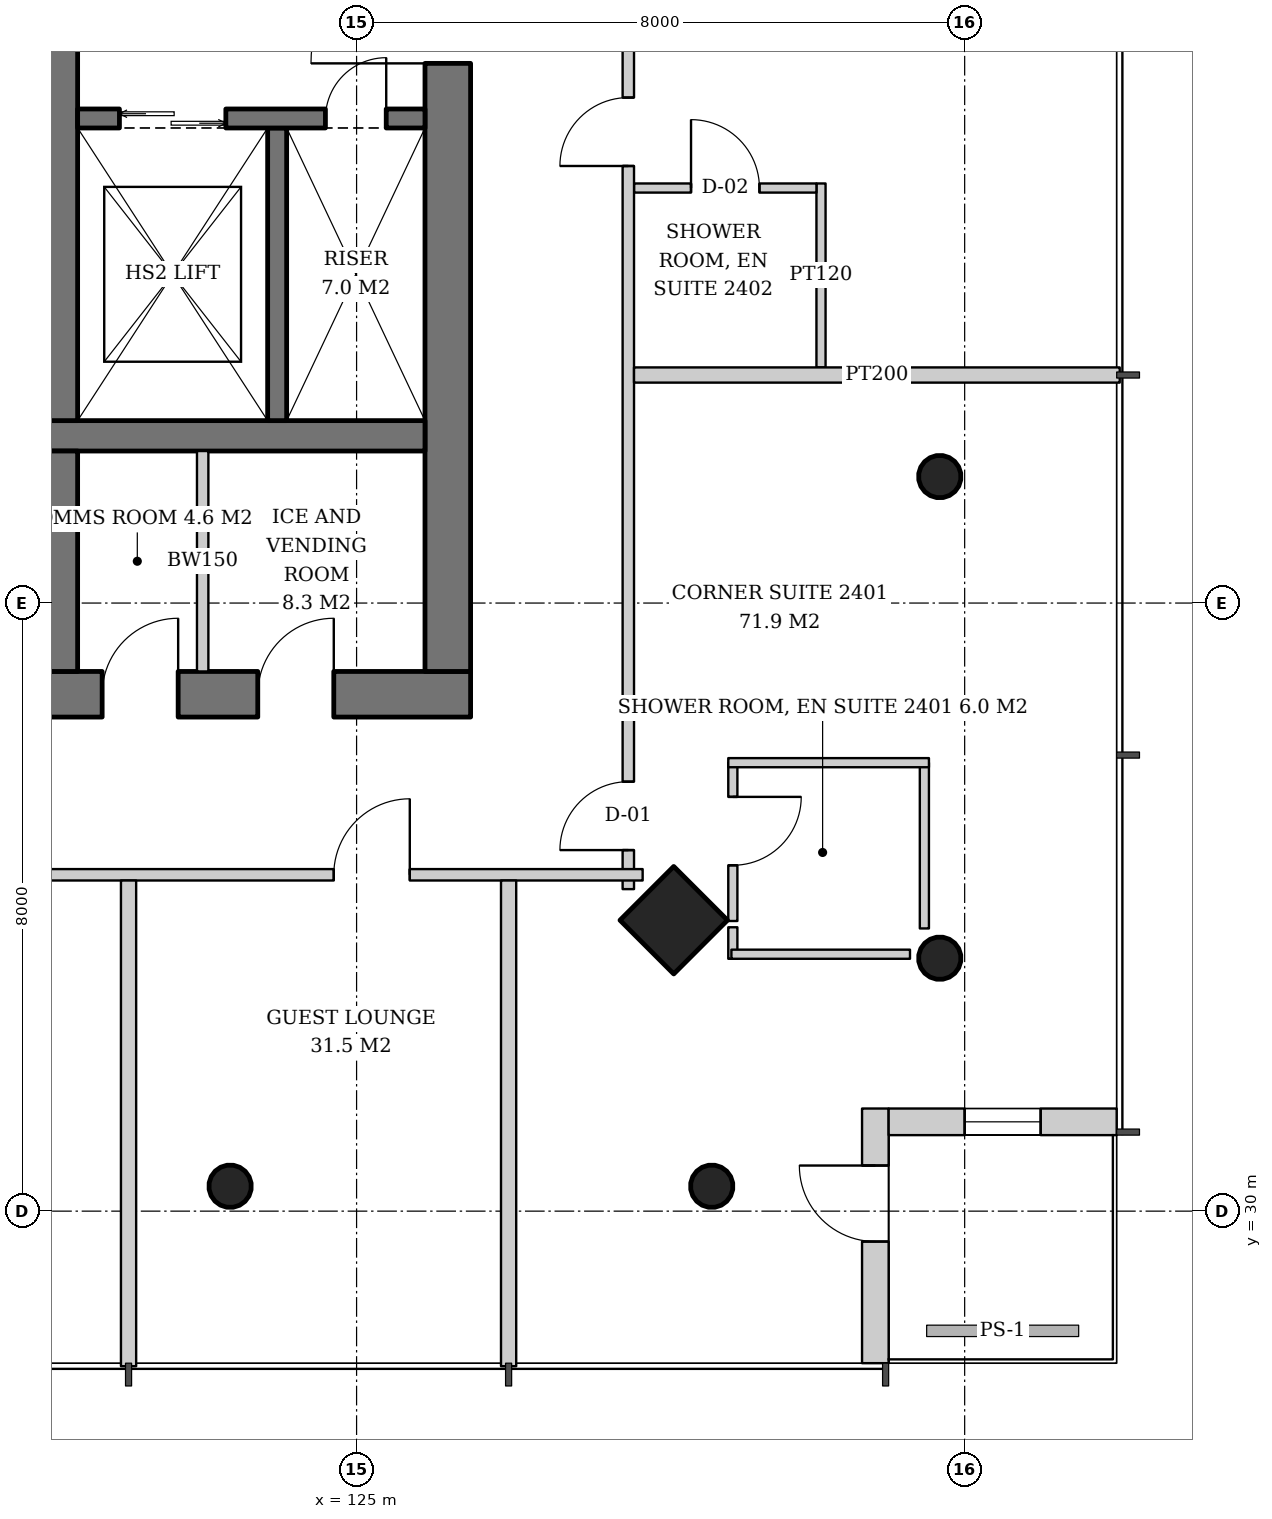
"""IFC4 building model, lengths in metres.
Left out: names, types, materials, properties, quantities, classifications, styles, units other than length and angle.
Written with IfcOpenShell. Run it as: python <this file> out.ifc"""

import sys

from ifc_helpers import new_model, si_unit, direction, frame, frame_2d, origin, origin_2d, place, context, subcontext, project, spatial, rectangle, hollow_circle, extrude, element, fill, save


model = new_model("IFC4")
c1 = context("Model", 3, precision=1e-05, world=origin(), true_north=direction((0.0, 1.0)))
c2 = subcontext(c1, "Body", "Model", "MODEL_VIEW")
j1 = project(units=[si_unit("LENGTHUNIT", "METRE"), si_unit("PLANEANGLEUNIT", "RADIAN")], contexts=[c1])
p1 = place(None, origin())
s1 = spatial("IfcSite", under=j1, at=p1, CompositionType="ELEMENT")
p2 = place(p1, origin())
s2 = spatial("IfcBuilding", under=s1, at=p2, CompositionType="ELEMENT")
p3 = place(p2, frame((0.0, 0.0, 97.0)))
s3 = spatial("IfcBuildingStorey", under=s2, at=p3, CompositionType="ELEMENT", Elevation=97.0)
p4 = place(p3, frame((132.724, 33.276, 0.0), z_axis=(-0.043029647111, 0.043029647111, 0.998146732169), x_axis=(-0.707106781187, -0.707106781187, 0.0)))
e1 = element("IfcColumn", 1, at=p4, inside=s3, PredefinedType="COLUMN", context=c2, shape_type="SweptSolid", body=[
    extrude(hollow_circle(Radius=0.28, WallThickness=0.02, at=origin_2d()), origin(), (0.0, 0.0, 1.0), 3.807),
])
p5 = place(p3, frame((132.724, 39.638, 0.0), z_axis=(-0.043059584825, 0.021497706284, 0.998841188968), x_axis=(-0.446680166538, -0.894693706707, 0.0)))
e2 = element("IfcColumn", 2, at=p5, inside=s3, PredefinedType="COLUMN", context=c2, shape_type="SweptSolid", body=[
    extrude(hollow_circle(Radius=0.28, WallThickness=0.02, at=origin_2d()), origin(), (0.0, 0.0, 1.0), 3.804),
])
p6 = place(p3, frame((129.224, 33.776, 0.0), z_axis=(-0.043029647111, 0.043029647111, 0.998146732169), x_axis=(-0.707106781187, -0.707106781187, 0.0)))
e3 = element("IfcColumn", 3, at=p6, inside=s3, PredefinedType="COLUMN", context=c2, shape_type="SweptSolid", body=[
    extrude(rectangle(XDim=1.0, YDim=1.0, at=origin_2d()), origin(), (0.0, 0.0, 1.0), 3.807),
])
p7 = place(p3, frame((129.724, 30.276, 0.0), z_axis=(-0.043029647111, 0.043029647111, 0.998146732169), x_axis=(-0.707106781187, -0.707106781187, 0.0)))
e4 = element("IfcColumn", 4, at=p7, inside=s3, PredefinedType="COLUMN", context=c2, shape_type="SweptSolid", body=[
    extrude(hollow_circle(Radius=0.28, WallThickness=0.02, at=origin_2d()), origin(), (0.0, 0.0, 1.0), 3.807),
])
p8 = place(p3, frame((123.362, 30.276, 0.0), z_axis=(-0.021497706284, 0.043059584825, 0.998841188968), x_axis=(-0.894693706707, -0.446680166538, 0.0)))
e5 = element("IfcColumn", 5, at=p8, inside=s3, PredefinedType="COLUMN", context=c2, shape_type="SweptSolid", body=[
    extrude(hollow_circle(Radius=0.28, WallThickness=0.02, at=origin_2d()), origin(), (0.0, 0.0, 1.0), 3.804),
])
p9 = place(p3, frame((107.5, 36.8, 0.0), z_axis=(0.0, 0.0, 1.0), x_axis=(1.0, 0.0, 0.0)))
e6 = element("IfcWall", 6, at=p9, inside=s3, PredefinedType="SHEAR", context=c2, shape_type="SweptSolid", body=[
    extrude(rectangle(XDim=19.0, YDim=0.6, at=frame_2d((9.5, 0.0))), origin(), (0.0, 0.0, 1.0), 3.8),
])
p10 = place(p9, frame((3.9, 0.0, 0.0)))
e7 = element("IfcOpeningElement", 7, at=p10, cuts=e6, PredefinedType="OPENING", context=c2, shape_type="SweptSolid", body=[
    extrude(rectangle(XDim=1.0, YDim=2.1, at=frame_2d((0.5, 1.05))), frame((0.0, 0.31, 0.0), z_axis=(0.0, -1.0, 0.0), x_axis=(1.0, 0.0, 0.0)), (0.0, 0.0, 1.0), 0.62),
])
p11 = place(p9, frame((14.153, 0.0, 0.0)))
e8 = element("IfcOpeningElement", 8, at=p11, cuts=e6, PredefinedType="OPENING", context=c2, shape_type="SweptSolid", body=[
    extrude(rectangle(XDim=1.0, YDim=2.1, at=frame_2d((0.5, 1.05))), frame((0.0, 0.31, 0.0), z_axis=(0.0, -1.0, 0.0), x_axis=(1.0, 0.0, 0.0)), (0.0, 0.0, 1.0), 0.62),
])
p12 = place(p9, frame((16.2, 0.0, 0.0)))
e9 = element("IfcOpeningElement", 9, at=p12, cuts=e6, PredefinedType="OPENING", context=c2, shape_type="SweptSolid", body=[
    extrude(rectangle(XDim=1.0, YDim=2.1, at=frame_2d((0.5, 1.05))), frame((0.0, 0.31, 0.0), z_axis=(0.0, -1.0, 0.0), x_axis=(1.0, 0.0, 0.0)), (0.0, 0.0, 1.0), 0.62),
])
p13 = place(p3, frame((126.2, 37.1, 0.0), z_axis=(0.0, 0.0, 1.0), x_axis=(0.0, 1.0, 0.0)))
e10 = element("IfcWall", 10, at=p13, inside=s3, PredefinedType="SHEAR", context=c2, shape_type="SweptSolid", body=[
    extrude(rectangle(XDim=17.8, YDim=0.6, at=frame_2d((8.9, 0.0))), origin(), (0.0, 0.0, 1.0), 3.8),
])
p14 = place(p13, frame((8.0, 0.0, 0.0)))
e11 = element("IfcOpeningElement", 11, at=p14, cuts=e10, PredefinedType="OPENING", context=c2, shape_type="SweptSolid", body=[
    extrude(rectangle(XDim=1.8, YDim=2.4, at=frame_2d((0.9, 1.2))), frame((0.0, 0.31, 0.0), z_axis=(0.0, -1.0, 0.0), x_axis=(1.0, 0.0, 0.0)), (0.0, 0.0, 1.0), 0.62),
])
p15 = place(p3, frame((108.1, 40.2, 0.0), z_axis=(0.0, 0.0, 1.0), x_axis=(1.0, 0.0, 0.0)))
e12 = element("IfcWall", 12, at=p15, inside=s3, PredefinedType="SHEAR", context=c2, shape_type="SweptSolid", body=[
    extrude(rectangle(XDim=17.8, YDim=0.4, at=frame_2d((8.9, 0.0))), origin(), (0.0, 0.0, 1.0), 3.8),
])
p16 = place(p3, frame((121.13, 37.1, 0.0), z_axis=(0.0, 0.0, 1.0), x_axis=(0.0, 1.0, 0.0)))
e13 = element("IfcWall", 13, at=p16, inside=s3, PredefinedType="SHEAR", context=c2, shape_type="SweptSolid", body=[
    extrude(rectangle(XDim=2.9, YDim=0.4, at=frame_2d((1.45, 0.0))), origin(), (0.0, 0.0, 1.0), 3.8),
])
p17 = place(p3, frame((121.13, 40.4, 0.0), z_axis=(0.0, 0.0, 1.0), x_axis=(0.0, 1.0, 0.0)))
e14 = element("IfcWall", 14, at=p17, inside=s3, PredefinedType="SHEAR", context=c2, shape_type="SweptSolid", body=[
    extrude(rectangle(XDim=11.2, YDim=0.4, at=frame_2d((5.6, 0.0))), origin(), (0.0, 0.0, 1.0), 3.8),
])
p18 = place(p3, frame((131.825, 28.0, 0.0), z_axis=(0.0, 0.0, 1.0), x_axis=(0.0, 1.0, 0.0)))
e15 = element("IfcWall", 15, at=p18, inside=s3, PredefinedType="SOLIDWALL", context=c2, shape_type="SweptSolid", body=[
    extrude(rectangle(XDim=3.35, YDim=0.35, at=frame_2d((1.675, 0.0))), origin(), (0.0, 0.0, 1.0), 3.6),
])
p19 = place(p18, frame((1.6, 0.0, 0.0)))
e16 = element("IfcOpeningElement", 16, at=p19, cuts=e15, PredefinedType="OPENING", context=c2, shape_type="SweptSolid", body=[
    extrude(rectangle(XDim=1.0, YDim=2.4, at=frame_2d((0.5, 1.2))), frame((0.0, 0.185, 0.0), z_axis=(0.0, -1.0, 0.0), x_axis=(1.0, 0.0, 0.0)), (0.0, 0.0, 1.0), 0.37),
])
p20 = place(p3, frame((132.0, 31.175, 0.0), z_axis=(0.0, 0.0, 1.0), x_axis=(1.0, 0.0, 0.0)))
e17 = element("IfcWall", 17, at=p20, inside=s3, PredefinedType="SOLIDWALL", context=c2, shape_type="SweptSolid", body=[
    extrude(rectangle(XDim=3.0, YDim=0.35, at=frame_2d((1.5, 0.0))), origin(), (0.0, 0.0, 1.0), 3.6),
])
p21 = place(p20, frame((1.0, 0.0, 0.9)))
e18 = element("IfcOpeningElement", 18, at=p21, cuts=e17, PredefinedType="OPENING", context=c2, shape_type="SweptSolid", body=[
    extrude(rectangle(XDim=1.0, YDim=2.4, at=frame_2d((0.5, 1.2))), frame((0.0, 0.185, 0.0), z_axis=(0.0, -1.0, 0.0), x_axis=(1.0, 0.0, 0.0)), (0.0, 0.0, 1.0), 0.37),
])
p22 = place(p3, frame((123.955, 44.25, 0.0), z_axis=(0.0, 0.0, 1.0), x_axis=(0.0, -1.0, 0.0)))
e19 = element("IfcWall", 19, at=p22, inside=s3, PredefinedType="SHEAR", context=c2, shape_type="SweptSolid", body=[
    extrude(rectangle(XDim=3.85, YDim=0.25, at=frame_2d((1.925, 0.0))), origin(), (0.0, 0.0, 1.0), 3.8),
])
p23 = place(p3, frame((121.33, 44.375, 0.0), z_axis=(0.0, 0.0, 1.0), x_axis=(1.0, 0.0, 0.0)))
e20 = element("IfcWall", 20, at=p23, inside=s3, PredefinedType="SHEAR", context=c2, shape_type="SweptSolid", body=[
    extrude(rectangle(XDim=4.57, YDim=0.25, at=frame_2d((2.285, 0.0))), origin(), (0.0, 0.0, 1.0), 3.8),
])
p24 = place(p23, frame((0.55, 0.0, 0.0)))
e21 = element("IfcOpeningElement", 21, at=p24, cuts=e20, PredefinedType="OPENING", context=c2, shape_type="SweptSolid", body=[
    extrude(rectangle(XDim=1.4, YDim=2.4, at=frame_2d((0.7, 1.2))), frame((0.0, 0.135, 0.0), z_axis=(0.0, -1.0, 0.0), x_axis=(1.0, 0.0, 0.0)), (0.0, 0.0, 1.0), 0.27),
])
p25 = place(p23, frame((3.26, 0.0, 0.0)))
e22 = element("IfcOpeningElement", 22, at=p25, cuts=e20, PredefinedType="OPENING", context=c2, shape_type="SweptSolid", body=[
    extrude(rectangle(XDim=0.8, YDim=2.0, at=frame_2d((0.4, 1.0))), frame((0.0, 0.135, 0.0), z_axis=(0.0, -1.0, 0.0), x_axis=(1.0, 0.0, 0.0)), (0.0, 0.0, 1.0), 0.27),
])
p26 = place(p3, frame((122.975, 37.1, 0.0), z_axis=(0.0, 0.0, 1.0), x_axis=(0.0, 1.0, 0.0)))
e23 = element("IfcWall", 23, at=p26, inside=s3, PredefinedType="SOLIDWALL", context=c2, shape_type="SweptSolid", body=[
    extrude(rectangle(XDim=2.9, YDim=0.15, at=frame_2d((1.45, 0.0))), origin(), (0.0, 0.0, 1.0), 3.6),
])
p27 = place(p3, frame((129.95, 35.9, 0.0), z_axis=(0.0, 0.0, 1.0), x_axis=(0.0, -1.0, 0.0)))
e24 = element("IfcWall", 24, at=p27, inside=s3, PredefinedType="PARTITIONING", context=c2, shape_type="SweptSolid", body=[
    extrude(rectangle(XDim=2.083, YDim=0.12, at=frame_2d((1.042, 0.0))), origin(), (0.0, 0.0, 1.0), 3.2),
])
p28 = place(p27, frame((0.45, 0.0, 0.0)))
e25 = element("IfcOpeningElement", 25, at=p28, cuts=e24, PredefinedType="OPENING", context=c2, shape_type="SweptSolid", body=[
    extrude(rectangle(XDim=0.9, YDim=2.1, at=frame_2d((0.45, 1.05))), frame((0.0, 0.07, 0.0), z_axis=(0.0, -1.0, 0.0), x_axis=(1.0, 0.0, 0.0)), (0.0, 0.0, 1.0), 0.14),
])
p29 = place(p3, frame((129.95, 33.735, 0.0), z_axis=(0.0, 0.0, 1.0), x_axis=(0.0, -1.0, 0.0)))
e26 = element("IfcWall", 26, at=p29, inside=s3, PredefinedType="PARTITIONING", context=c2, shape_type="SweptSolid", body=[
    extrude(rectangle(XDim=0.415, YDim=0.12, at=frame_2d((0.207, 0.0))), origin(), (0.0, 0.0, 1.0), 3.2),
])
p30 = place(p3, frame((132.47, 35.9, 0.0), z_axis=(0.0, 0.0, 1.0), x_axis=(0.0, -1.0, 0.0)))
e27 = element("IfcWall", 27, at=p30, inside=s3, PredefinedType="PARTITIONING", context=c2, shape_type="SweptSolid", body=[
    extrude(rectangle(XDim=2.181, YDim=0.12, at=frame_2d((1.09, 0.0))), origin(), (0.0, 0.0, 1.0), 3.2),
])
p31 = place(p3, frame((129.931, 33.38, 0.0), z_axis=(0.0, 0.0, 1.0), x_axis=(1.0, 0.0, 0.0)))
e28 = element("IfcWall", 28, at=p31, inside=s3, PredefinedType="PARTITIONING", context=c2, shape_type="SweptSolid", body=[
    extrude(rectangle(XDim=2.35, YDim=0.12, at=frame_2d((1.175, 0.0))), origin(), (0.0, 0.0, 1.0), 3.2),
])
p32 = place(p3, frame((129.89, 35.9, 0.0), z_axis=(0.0, 0.0, 1.0), x_axis=(1.0, 0.0, 0.0)))
e29 = element("IfcWall", 29, at=p32, inside=s3, PredefinedType="PARTITIONING", context=c2, shape_type="SweptSolid", body=[
    extrude(rectangle(XDim=2.64, YDim=0.12, at=frame_2d((1.32, 0.0))), origin(), (0.0, 0.0, 1.0), 3.2),
])
p33 = place(p3, frame((131.11, 41.1, 0.0), z_axis=(0.0, 0.0, 1.0), x_axis=(0.0, 1.0, 0.0)))
e30 = element("IfcWall", 30, at=p33, inside=s3, PredefinedType="PARTITIONING", context=c2, shape_type="SweptSolid", body=[
    extrude(rectangle(XDim=2.42, YDim=0.12, at=frame_2d((1.21, 0.0))), origin(), (0.0, 0.0, 1.0), 3.6),
])
p34 = place(p3, frame((128.65, 43.46, 0.0), z_axis=(0.0, 0.0, 1.0), x_axis=(1.0, 0.0, 0.0)))
e31 = element("IfcWall", 31, at=p34, inside=s3, PredefinedType="PARTITIONING", context=c2, shape_type="SweptSolid", body=[
    extrude(rectangle(XDim=2.4, YDim=0.12, at=frame_2d((1.2, 0.0))), origin(), (0.0, 0.0, 1.0), 3.6),
])
p35 = place(p34, frame((0.75, 0.0, 0.0)))
e32 = element("IfcOpeningElement", 32, at=p35, cuts=e31, PredefinedType="OPENING", context=c2, shape_type="SweptSolid", body=[
    extrude(rectangle(XDim=0.9, YDim=2.1, at=frame_2d((0.45, 1.05))), frame((0.0, 0.07, 0.0), z_axis=(0.0, -1.0, 0.0), x_axis=(1.0, 0.0, 0.0)), (0.0, 0.0, 1.0), 0.14),
])
p36 = place(p3, frame((128.575, 34.236, 0.0), z_axis=(0.0, 0.0, 1.0), x_axis=(0.0, 1.0, 0.0)))
e33 = element("IfcWall", 33, at=p36, inside=s3, PredefinedType="PARTITIONING", context=c2, shape_type="SweptSolid", body=[
    extrude(rectangle(XDim=23.527, YDim=0.15, at=frame_2d((11.764, 0.0))), origin(), (0.0, 0.0, 1.0), 2.9),
])
p37 = place(p36, frame((0.514, 0.0, 0.0)))
e34 = element("IfcOpeningElement", 34, at=p37, cuts=e33, PredefinedType="OPENING", context=c2, shape_type="SweptSolid", body=[
    extrude(rectangle(XDim=0.9, YDim=2.1, at=frame_2d((0.45, 1.05))), frame((0.0, 0.085, 0.0), z_axis=(0.0, -1.0, 0.0), x_axis=(1.0, 0.0, 0.0)), (0.0, 0.0, 1.0), 0.17),
])
p38 = place(p36, frame((9.514, 0.0, 0.0)))
e35 = element("IfcOpeningElement", 35, at=p38, cuts=e33, PredefinedType="OPENING", context=c2, shape_type="SweptSolid", body=[
    extrude(rectangle(XDim=0.9, YDim=2.1, at=frame_2d((0.45, 1.05))), frame((0.0, 0.085, 0.0), z_axis=(0.0, -1.0, 0.0), x_axis=(1.0, 0.0, 0.0)), (0.0, 0.0, 1.0), 0.17),
])
p39 = place(p36, frame((18.114, 0.0, 0.0)))
e36 = element("IfcOpeningElement", 36, at=p39, cuts=e33, PredefinedType="OPENING", context=c2, shape_type="SweptSolid", body=[
    extrude(rectangle(XDim=0.9, YDim=2.1, at=frame_2d((0.45, 1.05))), frame((0.0, 0.085, 0.0), z_axis=(0.0, -1.0, 0.0), x_axis=(1.0, 0.0, 0.0)), (0.0, 0.0, 1.0), 0.17),
])
p40 = place(p3, frame((128.65, 41.0, 0.0), z_axis=(0.0, 0.0, 1.0), x_axis=(1.0, 0.0, 0.0)))
e37 = element("IfcWall", 37, at=p40, inside=s3, PredefinedType="PARTITIONING", context=c2, shape_type="SweptSolid", body=[
    extrude(rectangle(XDim=6.39, YDim=0.2, at=frame_2d((3.195, 0.0))), origin(), (0.0, 0.0, 1.0), 3.0),
])
p41 = place(p3, frame((105.236, 34.425, 0.0), z_axis=(0.0, 0.0, 1.0), x_axis=(1.0, 0.0, 0.0)))
e38 = element("IfcWall", 38, at=p41, inside=s3, PredefinedType="PARTITIONING", context=c2, shape_type="SweptSolid", body=[
    extrude(rectangle(XDim=23.527, YDim=0.15, at=frame_2d((11.764, 0.0))), origin(), (0.0, 0.0, 1.0), 2.9),
])
p42 = place(p41, frame((0.514, 0.0, 0.0)))
e39 = element("IfcOpeningElement", 39, at=p42, cuts=e38, PredefinedType="OPENING", context=c2, shape_type="SweptSolid", body=[
    extrude(rectangle(XDim=0.9, YDim=2.1, at=frame_2d((0.45, 1.05))), frame((0.0, 0.085, 0.0), z_axis=(0.0, -1.0, 0.0), x_axis=(1.0, 0.0, 0.0)), (0.0, 0.0, 1.0), 0.17),
])
p43 = place(p41, frame((9.514, 0.0, 0.0)))
e40 = element("IfcOpeningElement", 40, at=p43, cuts=e38, PredefinedType="OPENING", context=c2, shape_type="SweptSolid", body=[
    extrude(rectangle(XDim=0.9, YDim=2.1, at=frame_2d((0.45, 1.05))), frame((0.0, 0.085, 0.0), z_axis=(0.0, -1.0, 0.0), x_axis=(1.0, 0.0, 0.0)), (0.0, 0.0, 1.0), 0.17),
])
p44 = place(p41, frame((19.464, 0.0, 0.0)))
e41 = element("IfcOpeningElement", 41, at=p44, cuts=e38, PredefinedType="OPENING", context=c2, shape_type="SweptSolid", body=[
    extrude(rectangle(XDim=1.0, YDim=2.1, at=frame_2d((0.5, 1.05))), frame((0.0, 0.085, 0.0), z_axis=(0.0, -1.0, 0.0), x_axis=(1.0, 0.0, 0.0)), (0.0, 0.0, 1.0), 0.17),
])
for number, where, z_axis, x_axis in (
    (42, (122.0, 34.35, 0.0), (0.0, 0.0, 1.0), (0.0, -1.0, 0.0)),
    (43, (127.0, 34.35, 0.0), (0.0, 0.0, 1.0), (0.0, -1.0, 0.0)),
):
    element("IfcWall", number, at=place(p3, frame(where, z_axis=z_axis, x_axis=x_axis)), inside=s3, PredefinedType="PARTITIONING", context=c2, shape_type="SweptSolid", body=[
        extrude(rectangle(XDim=6.39, YDim=0.2, at=frame_2d((3.195, 0.0))), origin(), (0.0, 0.0, 1.0), 3.2),
    ])
p45 = place(p19, origin())
e44 = element("IfcDoor", 44, at=p45, inside=s3, OperationType="SINGLE_SWING_RIGHT", PredefinedType="DOOR", context=c2, shape_type="SweptSolid", body=[
    extrude(rectangle(XDim=1.0, YDim=2.4, at=frame_2d((0.5, 1.2))), frame((0.0, 0.025, 0.0), z_axis=(0.0, -1.0, 0.0), x_axis=(1.0, 0.0, 0.0)), (0.0, 0.0, 1.0), 0.05),
])
fill(e16, e44)
p46 = place(p21, origin())
e45 = element("IfcWindow", 45, at=p46, inside=s3, PartitioningType="SINGLE_PANEL", PredefinedType="WINDOW", context=c2, shape_type="SweptSolid", body=[
    extrude(rectangle(XDim=1.0, YDim=2.4, at=frame_2d((0.5, 1.2))), frame((0.0, 0.03, 0.0), z_axis=(0.0, -1.0, 0.0), x_axis=(1.0, 0.0, 0.0)), (0.0, 0.0, 1.0), 0.06),
])
fill(e18, e45)
p47 = place(p24, origin())
e46 = element("IfcDoor", 46, at=p47, inside=s3, OperationType="DOUBLE_DOOR_SLIDING", PredefinedType="DOOR", context=c2, shape_type="SweptSolid", body=[
    extrude(rectangle(XDim=1.4, YDim=2.4, at=frame_2d((0.7, 1.2))), frame((0.0, 0.025, 0.0), z_axis=(0.0, -1.0, 0.0), x_axis=(1.0, 0.0, 0.0)), (0.0, 0.0, 1.0), 0.05),
])
fill(e21, e46)
p48 = place(p25, origin())
e47 = element("IfcDoor", 47, at=p48, inside=s3, OperationType="SINGLE_SWING_RIGHT", PredefinedType="DOOR", context=c2, shape_type="SweptSolid", body=[
    extrude(rectangle(XDim=0.8, YDim=2.0, at=frame_2d((0.4, 1.0))), frame((0.0, 0.025, 0.0), z_axis=(0.0, -1.0, 0.0), x_axis=(1.0, 0.0, 0.0)), (0.0, 0.0, 1.0), 0.05),
])
fill(e22, e47)
p49 = place(p14, origin())
e48 = element("IfcDoor", 48, at=p49, inside=s3, OperationType="DOUBLE_DOOR_SINGLE_SWING", PredefinedType="DOOR", context=c2, shape_type="SweptSolid", body=[
    extrude(rectangle(XDim=1.8, YDim=2.4, at=frame_2d((0.9, 1.2))), frame((0.0, 0.025, 0.0), z_axis=(0.0, -1.0, 0.0), x_axis=(1.0, 0.0, 0.0)), (0.0, 0.0, 1.0), 0.05),
])
fill(e11, e48)
p50 = place(p11, origin())
e49 = element("IfcDoor", 49, at=p50, inside=s3, OperationType="SINGLE_SWING_RIGHT", PredefinedType="DOOR", context=c2, shape_type="SweptSolid", body=[
    extrude(rectangle(XDim=1.0, YDim=2.1, at=frame_2d((0.5, 1.05))), frame((0.0, 0.29, 0.0), z_axis=(0.0, -1.0, 0.0), x_axis=(1.0, 0.0, 0.0)), (0.0, 0.0, 1.0), 0.05),
])
fill(e8, e49)
p51 = place(p12, origin())
e50 = element("IfcDoor", 50, at=p51, inside=s3, OperationType="SINGLE_SWING_RIGHT", PredefinedType="DOOR", context=c2, shape_type="SweptSolid", body=[
    extrude(rectangle(XDim=1.0, YDim=2.1, at=frame_2d((0.5, 1.05))), frame((0.0, 0.29, 0.0), z_axis=(0.0, -1.0, 0.0), x_axis=(1.0, 0.0, 0.0)), (0.0, 0.0, 1.0), 0.05),
])
fill(e9, e50)
p52 = place(p28, origin())
e51 = element("IfcDoor", 51, at=p52, inside=s3, OperationType="SINGLE_SWING_LEFT", PredefinedType="DOOR", context=c2, shape_type="SweptSolid", body=[
    extrude(rectangle(XDim=0.9, YDim=2.1, at=frame_2d((0.45, 1.05))), frame((0.0, 0.025, 0.0), z_axis=(0.0, -1.0, 0.0), x_axis=(1.0, 0.0, 0.0)), (0.0, 0.0, 1.0), 0.05),
])
fill(e25, e51)
p53 = place(p35, origin())
e52 = element("IfcDoor", 52, at=p53, inside=s3, OperationType="SINGLE_SWING_LEFT", PredefinedType="DOOR", context=c2, shape_type="SweptSolid", body=[
    extrude(rectangle(XDim=0.9, YDim=2.1, at=frame_2d((0.45, 1.05))), frame((0.0, 0.025, 0.0), z_axis=(0.0, -1.0, 0.0), x_axis=(1.0, 0.0, 0.0)), (0.0, 0.0, 1.0), 0.05),
])
fill(e32, e52)
p54 = place(p37, origin())
e53 = element("IfcDoor", 53, at=p54, inside=s3, OperationType="SINGLE_SWING_LEFT", PredefinedType="DOOR", context=c2, shape_type="SweptSolid", body=[
    extrude(rectangle(XDim=0.9, YDim=2.1, at=frame_2d((0.45, 1.05))), frame((0.0, 0.025, 0.0), z_axis=(0.0, -1.0, 0.0), x_axis=(1.0, 0.0, 0.0)), (0.0, 0.0, 1.0), 0.05),
])
fill(e34, e53)
p55 = place(p38, origin())
e54 = element("IfcDoor", 54, at=p55, inside=s3, OperationType="SINGLE_SWING_LEFT", PredefinedType="DOOR", context=c2, shape_type="SweptSolid", body=[
    extrude(rectangle(XDim=0.9, YDim=2.1, at=frame_2d((0.45, 1.05))), frame((0.0, 0.025, 0.0), z_axis=(0.0, -1.0, 0.0), x_axis=(1.0, 0.0, 0.0)), (0.0, 0.0, 1.0), 0.05),
])
fill(e35, e54)
p56 = place(p44, origin())
e55 = element("IfcDoor", 55, at=p56, inside=s3, OperationType="SINGLE_SWING_RIGHT", PredefinedType="DOOR", context=c2, shape_type="SweptSolid", body=[
    extrude(rectangle(XDim=1.0, YDim=2.1, at=frame_2d((0.5, 1.05))), frame((0.0, 0.025, 0.0), z_axis=(0.0, -1.0, 0.0), x_axis=(1.0, 0.0, 0.0)), (0.0, 0.0, 1.0), 0.05),
])
fill(e41, e55)
save(model, sys.argv[1])
